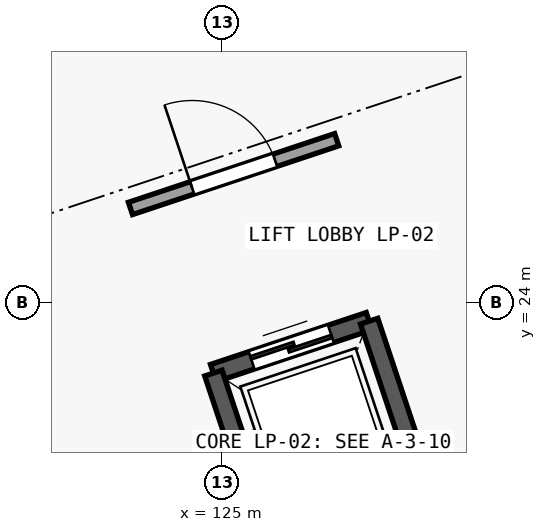
"""IFC4 building model, lengths in metres.
Left out: names, types, materials, properties, quantities, classifications, styles, units other than length and angle.
Written with IfcOpenShell. Run it as: python <this file> out.ifc"""

import sys

from ifc_helpers import new_model, si_unit, direction, frame, frame_2d, origin, place, context, subcontext, project, spatial, rectangle, extrude, element, fill, save


model = new_model("IFC4")
c1 = context("Model", 3, precision=1e-05, world=origin(), true_north=direction((0.0, 1.0)))
c2 = subcontext(c1, "Body", "Model", "MODEL_VIEW")
j1 = project(units=[si_unit("LENGTHUNIT", "METRE"), si_unit("PLANEANGLEUNIT", "RADIAN")], contexts=[c1])
p1 = place(None, origin())
s1 = spatial("IfcSite", under=j1, at=p1, CompositionType="ELEMENT")
p2 = place(p1, origin())
s2 = spatial("IfcBuilding", under=s1, at=p2, CompositionType="ELEMENT")
p3 = place(p2, frame((0.0, 0.0, -4.2)))
s3 = spatial("IfcBuildingStorey", under=s2, at=p3, CompositionType="ELEMENT", Elevation=-4.2)
p4 = place(p3, frame((124.888, 23.071, 0.0), z_axis=(0.0, 0.0, 1.0), x_axis=(0.948683298051, 0.316227766017, 0.0)))
e1 = element("IfcWall", 1, at=p4, inside=s3, PredefinedType="SOLIDWALL", context=c2, shape_type="SweptSolid", body=[
    extrude(rectangle(XDim=2.16, YDim=0.24, at=frame_2d((1.08, 0.0))), origin(), (0.0, 0.0, 1.0), 3.8),
])
p5 = place(p4, frame((0.53, 0.0, 0.0)))
e2 = element("IfcOpeningElement", 2, at=p5, cuts=e1, PredefinedType="OPENING", context=c2, shape_type="SweptSolid", body=[
    extrude(rectangle(XDim=1.1, YDim=2.15, at=frame_2d((0.55, 1.075))), frame((0.0, 0.13, 0.0), z_axis=(0.0, -1.0, 0.0), x_axis=(1.0, 0.0, 0.0)), (0.0, 0.0, 1.0), 0.26),
])
for number, where, z_axis, x_axis in (
    (3, (125.729, 20.548, 0.0), (0.0, 0.0, 1.0), (-0.316, 0.949, 0.0)),
    (4, (126.938, 23.754, 0.0), (0.0, 0.0, 1.0), (0.316, -0.949, 0.0)),
):
    element("IfcWall", number, at=place(p3, frame(where, z_axis=z_axis, x_axis=x_axis)), inside=s3, PredefinedType="SOLIDWALL", context=c2, shape_type="SweptSolid", body=[
        extrude(rectangle(XDim=2.66, YDim=0.24, at=frame_2d((1.33, 0.0))), origin(), (0.0, 0.0, 1.0), 3.8),
    ])
p6 = place(p3, frame((123.797, 25.237, 0.0), z_axis=(0.0, 0.0, 1.0), x_axis=(0.94869183448, 0.316202155576, 0.0)))
e5 = element("IfcWall", 5, at=p6, inside=s3, PredefinedType="PARTITIONING", context=c2, shape_type="SweptSolid", body=[
    extrude(rectangle(XDim=2.86, YDim=0.17, at=frame_2d((1.43, 0.0))), origin(), (0.0, 0.0, 1.0), 3.8),
])
p7 = place(p6, frame((0.855, 0.0, 0.0)))
e6 = element("IfcOpeningElement", 6, at=p7, cuts=e5, PredefinedType="OPENING", context=c2, shape_type="SweptSolid", body=[
    extrude(rectangle(XDim=1.15, YDim=2.15, at=frame_2d((0.575, 1.075))), frame((0.0, 0.095, 0.0), z_axis=(0.0, -1.0, 0.0), x_axis=(1.0, 0.0, 0.0)), (0.0, 0.0, 1.0), 0.19),
])
p8 = place(p5, origin())
e7 = element("IfcDoor", 7, at=p8, inside=s3, OperationType="DOUBLE_DOOR_SLIDING", PredefinedType="DOOR", context=c2, shape_type="SweptSolid", body=[
    extrude(rectangle(XDim=1.1, YDim=2.15, at=frame_2d((0.55, 1.075))), frame((0.0, 0.025, 0.0), z_axis=(0.0, -1.0, 0.0), x_axis=(1.0, 0.0, 0.0)), (0.0, 0.0, 1.0), 0.05),
])
fill(e2, e7)
p9 = place(p7, origin())
e8 = element("IfcDoor", 8, at=p9, inside=s3, OperationType="SINGLE_SWING_LEFT", PredefinedType="DOOR", context=c2, shape_type="SweptSolid", body=[
    extrude(rectangle(XDim=1.15, YDim=2.15, at=frame_2d((0.575, 1.075))), frame((0.0, 0.025, 0.0), z_axis=(0.0, -1.0, 0.0), x_axis=(1.0, 0.0, 0.0)), (0.0, 0.0, 1.0), 0.05),
])
fill(e6, e8)
save(model, sys.argv[1])
